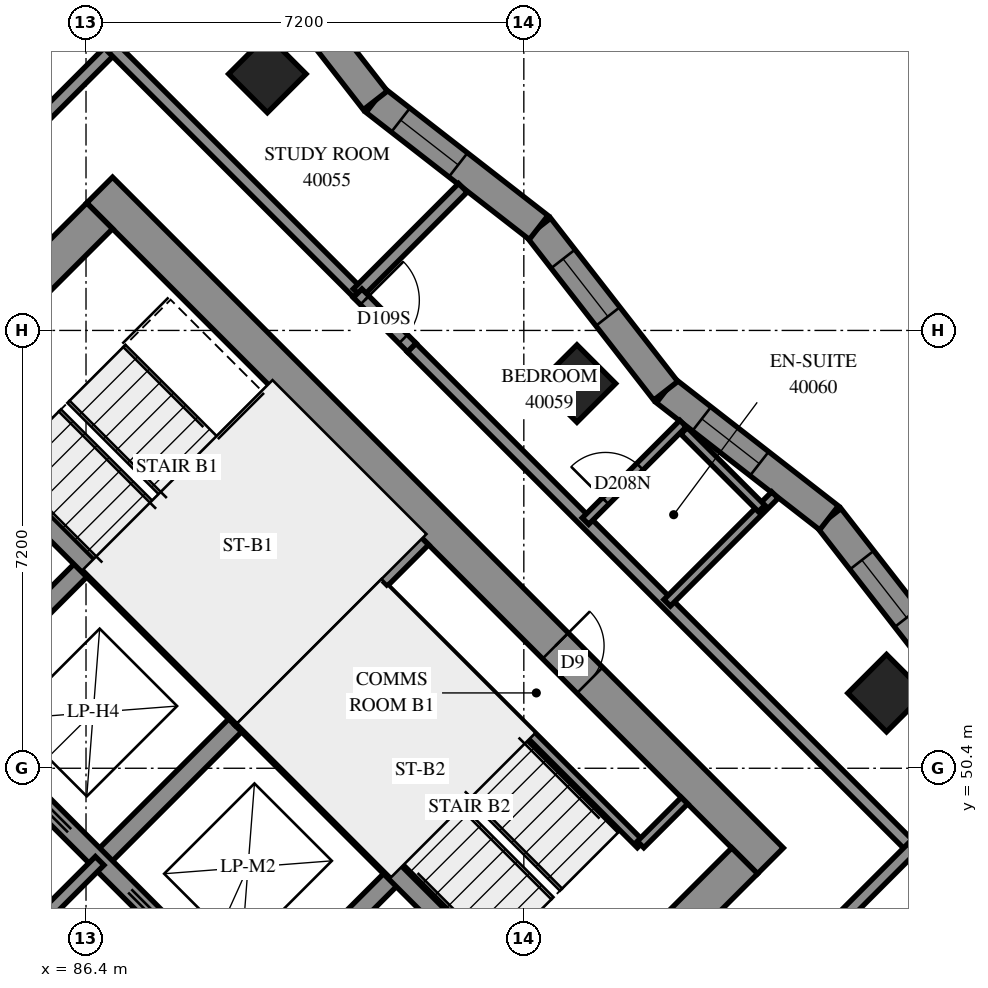
"""IFC4 building model, lengths in metres.
Left out: names, types, materials, properties, quantities, classifications, styles, units other than length and angle.
Written with IfcOpenShell. Run it as: python <this file> out.ifc"""

import sys

from ifc_helpers import new_model, si_unit, direction, frame, frame_2d, origin, origin_2d, place, context, subcontext, project, spatial, polyline, rectangle, outline, extrude, element, fill, save


model = new_model("IFC4")
c1 = context("Model", 3, precision=1e-05, world=origin(), true_north=direction((0.0, 1.0)))
c2 = subcontext(c1, "Body", "Model", "MODEL_VIEW")
j1 = project(units=[si_unit("LENGTHUNIT", "METRE"), si_unit("PLANEANGLEUNIT", "RADIAN")], contexts=[c1])
p1 = place(None, origin())
s1 = spatial("IfcSite", under=j1, at=p1, CompositionType="ELEMENT")
p2 = place(p1, origin())
s2 = spatial("IfcBuilding", under=s1, at=p2, CompositionType="ELEMENT")
p3 = place(p2, frame((0.0, 0.0, 149.0)))
s3 = spatial("IfcBuildingStorey", under=s2, at=p3, CompositionType="ELEMENT", Elevation=149.0)
for number, where, z_axis, x_axis in (
    (1, (89.382, 61.818, 0.0), (0.0, 0.0, 1.0), (0.707, -0.707, 0.0)),
    (2, (94.474, 56.727, 0.0), (0.0, 0.0, 1.0), (0.707, -0.707, 0.0)),
    (3, (99.565, 51.635, 0.0), (0.0, 0.0, 1.0), (0.707, -0.707, 0.0)),
):
    element("IfcColumn", number, at=place(p3, frame(where, z_axis=z_axis, x_axis=x_axis)), inside=s3, PredefinedType="COLUMN", context=c2, shape_type="SweptSolid", body=[
        extrude(rectangle(XDim=0.9, YDim=0.9, at=origin_2d()), origin(), (0.0, 0.0, 1.0), 3.1),
    ])
p4 = place(p3, frame((76.018, 49.302, -0.3), z_axis=(0.0, 0.0, 1.0), x_axis=(0.7071067812, -0.7071067812, 0.0)))
e4 = element("IfcWall", 4, at=p4, inside=s3, PredefinedType="SHEAR", context=c2, shape_type="SweptSolid", body=[
    extrude(rectangle(XDim=15.6, YDim=0.6, at=frame_2d((7.8, 0.0))), origin(), (0.0, 0.0, 1.0), 2.7),
])
p5 = place(p3, frame((86.625, 59.908, -0.3), z_axis=(0.0, 0.0, 1.0), x_axis=(0.7071067812, -0.7071067812, 0.0)))
e5 = element("IfcWall", 5, at=p5, inside=s3, PredefinedType="SHEAR", context=c2, shape_type="SweptSolid", body=[
    extrude(rectangle(XDim=15.6, YDim=0.6, at=frame_2d((7.8, 0.0))), origin(), (0.0, 0.0, 1.0), 2.7),
])
p6 = place(p5, frame((10.6, 0.0, 0.3)))
e6 = element("IfcOpeningElement", 6, at=p6, cuts=e5, PredefinedType="OPENING", context=c2, shape_type="SweptSolid", body=[
    extrude(rectangle(XDim=0.8, YDim=2.1, at=frame_2d((0.4, 1.05))), frame((0.0, 0.31, 0.0), z_axis=(0.0, -1.0, 0.0), x_axis=(1.0, 0.0, 0.0)), (0.0, 0.0, 1.0), 0.62),
])
p7 = place(p3, frame((76.442, 49.302, -0.3), z_axis=(0.0, 0.0, 1.0), x_axis=(0.7071067812, 0.7071067812, 0.0)))
e7 = element("IfcWall", 7, at=p7, inside=s3, PredefinedType="SHEAR", context=c2, shape_type="SweptSolid", body=[
    extrude(rectangle(XDim=14.4, YDim=0.6, at=frame_2d((7.2, 0.0))), origin(), (0.0, 0.0, 1.0), 2.7),
])
p8 = place(p7, frame((4.55, 0.0, 0.3)))
e8 = element("IfcOpeningElement", 8, at=p8, cuts=e7, PredefinedType="OPENING", context=c2, shape_type="SweptSolid", body=[
    extrude(rectangle(XDim=1.1, YDim=2.1, at=frame_2d((0.55, 1.05))), frame((0.0, 0.31, 0.0), z_axis=(0.0, -1.0, 0.0), x_axis=(1.0, 0.0, 0.0)), (0.0, 0.0, 1.0), 0.62),
])
p9 = place(p7, frame((11.35, 0.0, 0.3)))
e9 = element("IfcOpeningElement", 9, at=p9, cuts=e7, PredefinedType="OPENING", context=c2, shape_type="SweptSolid", body=[
    extrude(rectangle(XDim=1.1, YDim=2.1, at=frame_2d((0.55, 1.05))), frame((0.0, 0.31, 0.0), z_axis=(0.0, -1.0, 0.0), x_axis=(1.0, 0.0, 0.0)), (0.0, 0.0, 1.0), 0.62),
])
p10 = place(p3, frame((87.049, 38.695, -0.3), z_axis=(0.0, 0.0, 1.0), x_axis=(0.7071067812, 0.7071067812, 0.0)))
e10 = element("IfcWall", 10, at=p10, inside=s3, PredefinedType="SHEAR", context=c2, shape_type="SweptSolid", body=[
    extrude(rectangle(XDim=14.4, YDim=0.6, at=frame_2d((7.2, 0.0))), origin(), (0.0, 0.0, 1.0), 2.7),
])
p11 = place(p10, frame((4.55, 0.0, 0.3)))
e11 = element("IfcOpeningElement", 11, at=p11, cuts=e10, PredefinedType="OPENING", context=c2, shape_type="SweptSolid", body=[
    extrude(rectangle(XDim=1.1, YDim=2.1, at=frame_2d((0.55, 1.05))), frame((0.0, 0.31, 0.0), z_axis=(0.0, -1.0, 0.0), x_axis=(1.0, 0.0, 0.0)), (0.0, 0.0, 1.0), 0.62),
])
p12 = place(p10, frame((11.35, 0.0, 0.3)))
e12 = element("IfcOpeningElement", 12, at=p12, cuts=e10, PredefinedType="OPENING", context=c2, shape_type="SweptSolid", body=[
    extrude(rectangle(XDim=1.1, YDim=2.1, at=frame_2d((0.55, 1.05))), frame((0.0, 0.31, 0.0), z_axis=(0.0, -1.0, 0.0), x_axis=(1.0, 0.0, 0.0)), (0.0, 0.0, 1.0), 0.62),
])
p13 = place(p3, frame((84.079, 51.423, 0.0), z_axis=(0.0, 0.0, 1.0), x_axis=(0.7071219326, 0.7070916295, 0.0)))
e13 = element("IfcWall", 13, at=p13, inside=s3, PredefinedType="SOLIDWALL", context=c2, shape_type="SweptSolid", body=[
    extrude(rectangle(XDim=3.3, YDim=0.3, at=frame_2d((1.65, 0.0))), origin(), (0.0, 0.0, 1.0), 3.1),
])
for number, where, z_axis, x_axis in (
    (14, (86.625, 48.878, 0.0), (0.0, 0.0, 1.0), (0.707, 0.707, 0.0)),
    (15, (89.17, 46.332, 0.0), (0.0, 0.0, 1.0), (0.707, 0.707, 0.0)),
):
    element("IfcWall", number, at=place(p3, frame(where, z_axis=z_axis, x_axis=x_axis)), inside=s3, PredefinedType="SOLIDWALL", context=c2, shape_type="SweptSolid", body=[
        extrude(rectangle(XDim=3.3, YDim=0.3, at=frame_2d((1.65, 0.0))), origin(), (0.0, 0.0, 1.0), 3.1),
    ])
p14 = place(p3, frame((78.988, 51.423, 0.0), z_axis=(0.0, 0.0, 1.0), x_axis=(0.7071067812, -0.7071067812, 0.0)))
e16 = element("IfcWall", 16, at=p14, inside=s3, PredefinedType="SOLIDWALL", context=c2, shape_type="SweptSolid", body=[
    extrude(rectangle(XDim=14.4, YDim=0.3, at=frame_2d((7.2, 0.0))), origin(), (0.0, 0.0, 1.0), 3.1),
])
p15 = place(p14, frame((1.35, 0.0, 0.0)))
e17 = element("IfcOpeningElement", 17, at=p15, cuts=e16, PredefinedType="OPENING", context=c2, shape_type="SweptSolid", body=[
    extrude(rectangle(XDim=0.9, YDim=2.1, at=frame_2d((0.45, 1.05))), frame((0.0, 0.16, 0.0), z_axis=(0.0, -1.0, 0.0), x_axis=(1.0, 0.0, 0.0)), (0.0, 0.0, 1.0), 0.32),
])
p16 = place(p14, frame((4.95, 0.0, 0.0)))
e18 = element("IfcOpeningElement", 18, at=p16, cuts=e16, PredefinedType="OPENING", context=c2, shape_type="SweptSolid", body=[
    extrude(rectangle(XDim=0.9, YDim=2.1, at=frame_2d((0.45, 1.05))), frame((0.0, 0.16, 0.0), z_axis=(0.0, -1.0, 0.0), x_axis=(1.0, 0.0, 0.0)), (0.0, 0.0, 1.0), 0.32),
])
p17 = place(p14, frame((8.55, 0.0, 0.0)))
e19 = element("IfcOpeningElement", 19, at=p17, cuts=e16, PredefinedType="OPENING", context=c2, shape_type="SweptSolid", body=[
    extrude(rectangle(XDim=0.9, YDim=2.1, at=frame_2d((0.45, 1.05))), frame((0.0, 0.16, 0.0), z_axis=(0.0, -1.0, 0.0), x_axis=(1.0, 0.0, 0.0)), (0.0, 0.0, 1.0), 0.32),
])
p18 = place(p14, frame((12.05, 0.0, 0.0)))
e20 = element("IfcOpeningElement", 20, at=p18, cuts=e16, PredefinedType="OPENING", context=c2, shape_type="SweptSolid", body=[
    extrude(rectangle(XDim=1.1, YDim=2.1, at=frame_2d((0.55, 1.05))), frame((0.0, 0.16, 0.0), z_axis=(0.0, -1.0, 0.0), x_axis=(1.0, 0.0, 0.0)), (0.0, 0.0, 1.0), 0.32),
])
p19 = place(p3, frame((81.534, 53.969, 0.0), z_axis=(0.0, 0.0, 1.0), x_axis=(0.707103309, -0.7071102534, 0.0)))
e21 = element("IfcWall", 21, at=p19, inside=s3, PredefinedType="SOLIDWALL", context=c2, shape_type="SweptSolid", body=[
    extrude(rectangle(XDim=14.4, YDim=0.3, at=frame_2d((7.2, 0.0))), origin(), (0.0, 0.0, 1.0), 3.1),
])
p20 = place(p19, frame((1.25, 0.0, 0.0)))
e22 = element("IfcOpeningElement", 22, at=p20, cuts=e21, PredefinedType="OPENING", context=c2, shape_type="SweptSolid", body=[
    extrude(rectangle(XDim=1.1, YDim=2.1, at=frame_2d((0.55, 1.05))), frame((0.0, 0.16, 0.0), z_axis=(0.0, -1.0, 0.0), x_axis=(1.0, 0.0, 0.0)), (0.0, 0.0, 1.0), 0.32),
])
p21 = place(p19, frame((4.85, 0.0, 0.0)))
e23 = element("IfcOpeningElement", 23, at=p21, cuts=e21, PredefinedType="OPENING", context=c2, shape_type="SweptSolid", body=[
    extrude(rectangle(XDim=1.1, YDim=2.1, at=frame_2d((0.55, 1.05))), frame((0.0, 0.16, 0.0), z_axis=(0.0, -1.0, 0.0), x_axis=(1.0, 0.0, 0.0)), (0.0, 0.0, 1.0), 0.32),
])
p22 = place(p19, frame((8.45, 0.0, 0.0)))
e24 = element("IfcOpeningElement", 24, at=p22, cuts=e21, PredefinedType="OPENING", context=c2, shape_type="SweptSolid", body=[
    extrude(rectangle(XDim=1.1, YDim=2.1, at=frame_2d((0.55, 1.05))), frame((0.0, 0.16, 0.0), z_axis=(0.0, -1.0, 0.0), x_axis=(1.0, 0.0, 0.0)), (0.0, 0.0, 1.0), 0.32),
])
p23 = place(p19, frame((12.05, 0.0, 0.0)))
e25 = element("IfcOpeningElement", 25, at=p23, cuts=e21, PredefinedType="OPENING", context=c2, shape_type="SweptSolid", body=[
    extrude(rectangle(XDim=1.1, YDim=2.1, at=frame_2d((0.55, 1.05))), frame((0.0, 0.16, 0.0), z_axis=(0.0, -1.0, 0.0), x_axis=(1.0, 0.0, 0.0)), (0.0, 0.0, 1.0), 0.32),
])
for number, where, z_axis, x_axis in (
    (26, (83.867, 56.302, 0.0), (0.0, 0.0, 1.0), (0.707, -0.707, 0.0)),
    (27, (88.958, 51.211, 0.0), (0.0, 0.0, 1.0), (0.707, -0.707, 0.0)),
):
    element("IfcWall", number, at=place(p3, frame(where, z_axis=z_axis, x_axis=x_axis)), inside=s3, PredefinedType="SOLIDWALL", context=c2, shape_type="SweptSolid", body=[
        extrude(rectangle(XDim=7.2, YDim=0.3, at=frame_2d((3.6, 0.0))), origin(), (0.0, 0.0, 1.0), 3.1),
    ])
p24 = place(p3, frame((88.958, 51.211, 0.0), z_axis=(0.0, 0.0, 1.0), x_axis=(0.7071067812, 0.7071067812, 0.0)))
e28 = element("IfcWall", 28, at=p24, inside=s3, PredefinedType="SOLIDWALL", context=c2, shape_type="SweptSolid", body=[
    extrude(rectangle(XDim=4.2, YDim=0.3, at=frame_2d((2.1, 0.0))), origin(), (0.0, 0.0, 1.0), 3.1),
])
p25 = place(p3, frame((100.709, 51.832, 0.0), z_axis=(0.0, 0.0, 1.0), x_axis=(-0.6141887905, 0.7891591282, 0.0)))
e29 = element("IfcWall", 29, at=p25, inside=s3, PredefinedType="SOLIDWALL", context=c2, shape_type="SweptSolid", body=[
    extrude(outline(polyline([(0.031, -0.25), (3.434, -0.25), (3.372, 0.25), (-0.031, 0.25), (0.031, -0.25)])), origin(), (0.0, 0.0, 1.0), 3.1),
])
p26 = place(p25, frame((1.323, 0.0, 0.45)))
e30 = element("IfcOpeningElement", 30, at=p26, cuts=e29, PredefinedType="OPENING", context=c2, shape_type="SweptSolid", body=[
    extrude(rectangle(XDim=1.2, YDim=2.5, at=frame_2d((0.6, 1.25))), frame((0.0, 0.26, 0.0), z_axis=(0.0, -1.0, 0.0), x_axis=(1.0, 0.0, 0.0)), (0.0, 0.0, 1.0), 0.52),
])
p27 = place(p3, frame((98.619, 54.517, 0.0), z_axis=(0.0, 0.0, 1.0), x_axis=(-0.7891480422, 0.6142030344, 0.0)))
e31 = element("IfcWall", 31, at=p27, inside=s3, PredefinedType="SOLIDWALL", context=c2, shape_type="SweptSolid", body=[
    extrude(outline(polyline([(-0.031, -0.25), (3.372, -0.25), (3.434, 0.25), (0.031, 0.25), (-0.031, -0.25)])), origin(), (0.0, 0.0, 1.0), 3.1),
])
p28 = place(p27, frame((1.452, 0.0, 0.45)))
e32 = element("IfcOpeningElement", 32, at=p28, cuts=e31, PredefinedType="OPENING", context=c2, shape_type="SweptSolid", body=[
    extrude(rectangle(XDim=1.2, YDim=2.5, at=frame_2d((0.6, 1.25))), frame((0.0, 0.26, 0.0), z_axis=(0.0, -1.0, 0.0), x_axis=(1.0, 0.0, 0.0)), (0.0, 0.0, 1.0), 0.52),
])
p29 = place(p3, frame((95.934, 56.607, 0.0), z_axis=(0.0, 0.0, 1.0), x_axis=(-0.6142030344, 0.7891480422, 0.0)))
e33 = element("IfcWall", 33, at=p29, inside=s3, PredefinedType="SOLIDWALL", context=c2, shape_type="SweptSolid", body=[
    extrude(outline(polyline([(0.031, -0.25), (3.434, -0.25), (3.372, 0.25), (-0.031, 0.25), (0.031, -0.25)])), origin(), (0.0, 0.0, 1.0), 3.1),
])
p30 = place(p29, frame((1.548, 0.0, 0.45)))
e34 = element("IfcOpeningElement", 34, at=p30, cuts=e33, PredefinedType="OPENING", context=c2, shape_type="SweptSolid", body=[
    extrude(rectangle(XDim=1.2, YDim=2.5, at=frame_2d((0.6, 1.25))), frame((0.0, 0.26, 0.0), z_axis=(0.0, -1.0, 0.0), x_axis=(1.0, 0.0, 0.0)), (0.0, 0.0, 1.0), 0.52),
])
p31 = place(p3, frame((93.844, 59.293, 0.0), z_axis=(0.0, 0.0, 1.0), x_axis=(-0.7891591282, 0.6141887905, 0.0)))
e35 = element("IfcWall", 35, at=p31, inside=s3, PredefinedType="SOLIDWALL", context=c2, shape_type="SweptSolid", body=[
    extrude(outline(polyline([(-0.031, -0.25), (3.372, -0.25), (3.434, 0.25), (0.031, 0.25), (-0.031, -0.25)])), origin(), (0.0, 0.0, 1.0), 3.1),
])
p32 = place(p31, frame((1.677, 0.0, 0.45)))
e36 = element("IfcOpeningElement", 36, at=p32, cuts=e35, PredefinedType="OPENING", context=c2, shape_type="SweptSolid", body=[
    extrude(rectangle(XDim=1.2, YDim=2.5, at=frame_2d((0.6, 1.25))), frame((0.0, 0.26, 0.0), z_axis=(0.0, -1.0, 0.0), x_axis=(1.0, 0.0, 0.0)), (0.0, 0.0, 1.0), 0.52),
])
p33 = place(p3, frame((91.158, 61.383, 0.0), z_axis=(0.0, 0.0, 1.0), x_axis=(-0.6141847326, 0.7891622864, 0.0)))
e37 = element("IfcWall", 37, at=p33, inside=s3, PredefinedType="SOLIDWALL", context=c2, shape_type="SweptSolid", body=[
    extrude(outline(polyline([(0.031, -0.25), (3.434, -0.25), (3.372, 0.25), (-0.031, 0.25), (0.031, -0.25)])), origin(), (0.0, 0.0, 1.0), 3.1),
])
p34 = place(p33, frame((1.774, 0.0, 0.45)))
e38 = element("IfcOpeningElement", 38, at=p34, cuts=e37, PredefinedType="OPENING", context=c2, shape_type="SweptSolid", body=[
    extrude(rectangle(XDim=1.2, YDim=2.5, at=frame_2d((0.6, 1.25))), frame((0.0, 0.26, 0.0), z_axis=(0.0, -1.0, 0.0), x_axis=(1.0, 0.0, 0.0)), (0.0, 0.0, 1.0), 0.52),
])
p35 = place(p3, frame((91.313, 53.354, 0.0), z_axis=(0.0, 0.0, 1.0), x_axis=(0.7071067812, -0.7071067812, 0.0)))
e39 = element("IfcWall", 39, at=p35, inside=s3, PredefinedType="PARTITIONING", context=c2, shape_type="SweptSolid", body=[
    extrude(rectangle(XDim=5.95, YDim=0.15, at=frame_2d((2.975, 0.0))), origin(), (0.0, 0.0, 1.0), 3.1),
])
p36 = place(p3, frame((95.52, 49.146, 0.0), z_axis=(0.0, 0.0, 1.0), x_axis=(0.7071067812, 0.7071067812, 0.0)))
e40 = element("IfcWall", 40, at=p36, inside=s3, PredefinedType="PARTITIONING", context=c2, shape_type="SweptSolid", body=[
    extrude(rectangle(XDim=1.02, YDim=0.15, at=frame_2d((0.51, 0.0))), origin(), (0.0, 0.0, 1.0), 3.1),
])
p37 = place(p3, frame((84.079, 46.332, 0.0), z_axis=(0.0, 0.0, 1.0), x_axis=(0.7071067812, 0.7071067812, 0.0)))
e41 = element("IfcWall", 41, at=p37, inside=s3, PredefinedType="PARTITIONING", context=c2, shape_type="SweptSolid", body=[
    extrude(rectangle(XDim=3.6, YDim=0.2, at=frame_2d((1.8, 0.0))), origin(), (0.0, 0.0, 1.0), 3.1),
])
p38 = place(p3, frame((91.755, 57.317, 0.0), z_axis=(0.0, 0.0, 1.0), x_axis=(0.7071067812, -0.7071067812, 0.0)))
e42 = element("IfcWall", 42, at=p38, inside=s3, PredefinedType="PARTITIONING", context=c2, shape_type="SweptSolid", body=[
    extrude(rectangle(XDim=11.639, YDim=0.2, at=frame_2d((5.819, 0.0))), origin(), (0.0, 0.0, 1.0), 3.1),
])
p39 = place(p3, frame((95.25, 42.232, 0.0), z_axis=(0.0, 0.0, 1.0), x_axis=(0.7071114274, 0.7071021349, 0.0)))
e43 = element("IfcWall", 43, at=p39, inside=s3, PredefinedType="PARTITIONING", context=c2, shape_type="SweptSolid", body=[
    extrude(rectangle(XDim=10.761, YDim=0.2, at=frame_2d((5.381, 0.0))), origin(), (0.0, 0.0, 1.0), 3.1),
])
p40 = place(p3, frame((80.899, 58.427, 0.0), z_axis=(0.0, 0.0, 1.0), x_axis=(0.707112163, 0.7071013993, 0.0)))
e44 = element("IfcWall", 44, at=p40, inside=s3, PredefinedType="PARTITIONING", context=c2, shape_type="SweptSolid", body=[
    extrude(rectangle(XDim=9.29, YDim=0.2, at=frame_2d((4.645, 0.0))), origin(), (0.0, 0.0, 1.0), 3.1),
])
p41 = place(p3, frame((94.19, 43.292, 0.0), z_axis=(0.0, 0.0, 1.0), x_axis=(0.7071067812, 0.7071067812, 0.0)))
e45 = element("IfcWall", 45, at=p41, inside=s3, PredefinedType="PARTITIONING", context=c2, shape_type="SweptSolid", body=[
    extrude(rectangle(XDim=8.2, YDim=0.2, at=frame_2d((4.1, 0.0))), origin(), (0.0, 0.0, 1.0), 3.1),
])
p42 = place(p41, frame((0.251, 0.0, 0.0)))
e46 = element("IfcOpeningElement", 46, at=p42, cuts=e45, PredefinedType="OPENING", context=c2, shape_type="SweptSolid", body=[
    extrude(rectangle(XDim=1.0, YDim=2.1, at=frame_2d((0.5, 1.05))), frame((0.0, 0.11, 0.0), z_axis=(0.0, -1.0, 0.0), x_axis=(1.0, 0.0, 0.0)), (0.0, 0.0, 1.0), 0.22),
])
p43 = place(p3, frame((81.038, 56.444, 0.0), z_axis=(0.0, 0.0, 1.0), x_axis=(0.7071067812, 0.7071067812, 0.0)))
e47 = element("IfcWall", 47, at=p43, inside=s3, PredefinedType="PARTITIONING", context=c2, shape_type="SweptSolid", body=[
    extrude(rectangle(XDim=8.2, YDim=0.2, at=frame_2d((4.1, 0.0))), origin(), (0.0, 0.0, 1.0), 3.1),
])
p44 = place(p43, frame((0.66, 0.0, 0.0)))
e48 = element("IfcOpeningElement", 48, at=p44, cuts=e47, PredefinedType="OPENING", context=c2, shape_type="SweptSolid", body=[
    extrude(rectangle(XDim=1.0, YDim=2.1, at=frame_2d((0.5, 1.05))), frame((0.0, 0.11, 0.0), z_axis=(0.0, -1.0, 0.0), x_axis=(1.0, 0.0, 0.0)), (0.0, 0.0, 1.0), 0.22),
])
p45 = place(p3, frame((86.841, 62.245, 0.0), z_axis=(0.0, 0.0, 1.0), x_axis=(0.7071067812, -0.7071067812, 0.0)))
e49 = element("IfcWall", 49, at=p45, inside=s3, PredefinedType="PARTITIONING", context=c2, shape_type="SweptSolid", body=[
    extrude(rectangle(XDim=5.699, YDim=0.2, at=frame_2d((2.85, 0.0))), origin(), (0.0, 0.0, 1.0), 3.1),
])
p46 = place(p3, frame((95.957, 53.121, 0.0), z_axis=(0.0, 0.0, 1.0), x_axis=(0.7071067812, 0.7071067812, 0.0)))
e50 = element("IfcWall", 50, at=p46, inside=s3, PredefinedType="PARTITIONING", context=c2, shape_type="SweptSolid", body=[
    extrude(rectangle(XDim=2.506, YDim=0.15, at=frame_2d((1.253, 0.0))), origin(), (0.0, 0.0, 1.0), 3.1),
])
p47 = place(p3, frame((90.867, 58.213, 0.0), z_axis=(0.0, 0.0, 1.0), x_axis=(0.7066165577, 0.707596665, 0.0)))
e51 = element("IfcWall", 51, at=p47, inside=s3, PredefinedType="PARTITIONING", context=c2, shape_type="SweptSolid", body=[
    extrude(rectangle(XDim=2.449, YDim=0.2, at=frame_2d((1.224, 0.0))), origin(), (0.0, 0.0, 1.0), 3.1),
])
p48 = place(p3, frame((94.614, 54.464, 0.0), z_axis=(0.0, 0.0, 1.0), x_axis=(0.7070847464, 0.7071288153, 0.0)))
e52 = element("IfcWall", 52, at=p48, inside=s3, PredefinedType="PARTITIONING", context=c2, shape_type="SweptSolid", body=[
    extrude(rectangle(XDim=2.269, YDim=0.15, at=frame_2d((1.135, 0.0))), origin(), (0.0, 0.0, 1.0), 3.1),
])
p49 = place(p48, frame((0.466, 0.0, 0.0)))
e53 = element("IfcOpeningElement", 53, at=p49, cuts=e52, PredefinedType="OPENING", context=c2, shape_type="SweptSolid", body=[
    extrude(rectangle(XDim=0.8, YDim=2.1, at=frame_2d((0.4, 1.05))), frame((0.0, 0.085, 0.0), z_axis=(0.0, -1.0, 0.0), x_axis=(1.0, 0.0, 0.0)), (0.0, 0.0, 1.0), 0.17),
])
p50 = place(p3, frame((96.235, 55.949, 0.0), z_axis=(0.0, 0.0, 1.0), x_axis=(0.7071067812, -0.7071067812, 0.0)))
e54 = element("IfcWall", 54, at=p50, inside=s3, PredefinedType="PARTITIONING", context=c2, shape_type="SweptSolid", body=[
    extrude(rectangle(XDim=1.804, YDim=0.15, at=frame_2d((0.902, 0.0))), origin(), (0.0, 0.0, 1.0), 3.1),
])
p51 = place(p3, frame((90.867, 58.211, 0.0), z_axis=(0.0, 0.0, 1.0), x_axis=(0.706312726, -0.7078999456, 0.0)))
e55 = element("IfcWall", 55, at=p51, inside=s3, PredefinedType="PARTITIONING", context=c2, shape_type="SweptSolid", body=[
    extrude(rectangle(XDim=1.26, YDim=0.2, at=frame_2d((0.63, 0.0))), origin(), (0.0, 0.0, 1.0), 3.1),
])
p52 = place(p51, frame((0.162, 0.0, 0.0)))
e56 = element("IfcOpeningElement", 56, at=p52, cuts=e55, PredefinedType="OPENING", context=c2, shape_type="SweptSolid", body=[
    extrude(rectangle(XDim=0.9, YDim=2.1, at=frame_2d((0.45, 1.05))), frame((0.0, 0.11, 0.0), z_axis=(0.0, -1.0, 0.0), x_axis=(1.0, 0.0, 0.0)), (0.0, 0.0, 1.0), 0.22),
])
p53 = place(p26, origin())
e57 = element("IfcWindow", 57, at=p53, inside=s3, PartitioningType="SINGLE_PANEL", PredefinedType="WINDOW", context=c2, shape_type="SweptSolid", body=[
    extrude(rectangle(XDim=1.2, YDim=2.5, at=frame_2d((0.6, 1.25))), frame((0.0, 0.18, 0.0), z_axis=(0.0, -1.0, 0.0), x_axis=(1.0, 0.0, 0.0)), (0.0, 0.0, 1.0), 0.06),
])
fill(e30, e57)
p54 = place(p28, origin())
e58 = element("IfcWindow", 58, at=p54, inside=s3, PartitioningType="SINGLE_PANEL", PredefinedType="WINDOW", context=c2, shape_type="SweptSolid", body=[
    extrude(rectangle(XDim=1.2, YDim=2.5, at=frame_2d((0.6, 1.25))), frame((0.0, 0.18, 0.0), z_axis=(0.0, -1.0, 0.0), x_axis=(1.0, 0.0, 0.0)), (0.0, 0.0, 1.0), 0.06),
])
fill(e32, e58)
p55 = place(p30, origin())
e59 = element("IfcWindow", 59, at=p55, inside=s3, PartitioningType="SINGLE_PANEL", PredefinedType="WINDOW", context=c2, shape_type="SweptSolid", body=[
    extrude(rectangle(XDim=1.2, YDim=2.5, at=frame_2d((0.6, 1.25))), frame((0.0, 0.18, 0.0), z_axis=(0.0, -1.0, 0.0), x_axis=(1.0, 0.0, 0.0)), (0.0, 0.0, 1.0), 0.06),
])
fill(e34, e59)
p56 = place(p32, origin())
e60 = element("IfcWindow", 60, at=p56, inside=s3, PartitioningType="SINGLE_PANEL", PredefinedType="WINDOW", context=c2, shape_type="SweptSolid", body=[
    extrude(rectangle(XDim=1.2, YDim=2.5, at=frame_2d((0.6, 1.25))), frame((0.0, 0.18, 0.0), z_axis=(0.0, -1.0, 0.0), x_axis=(1.0, 0.0, 0.0)), (0.0, 0.0, 1.0), 0.06),
])
fill(e36, e60)
p57 = place(p6, origin())
e61 = element("IfcDoor", 61, at=p57, inside=s3, OperationType="SINGLE_SWING_RIGHT", PredefinedType="DOOR", context=c2, shape_type="SweptSolid", body=[
    extrude(rectangle(XDim=0.8, YDim=2.1, at=frame_2d((0.4, 1.05))), frame((0.0, 0.025, 0.0), z_axis=(0.0, -1.0, 0.0), x_axis=(1.0, 0.0, 0.0)), (0.0, 0.0, 1.0), 0.05),
])
fill(e6, e61)
p58 = place(p52, origin())
e62 = element("IfcDoor", 62, at=p58, inside=s3, OperationType="SINGLE_SWING_RIGHT", PredefinedType="DOOR", context=c2, shape_type="SweptSolid", body=[
    extrude(rectangle(XDim=0.9, YDim=2.1, at=frame_2d((0.45, 1.05))), frame((0.0, 0.025, 0.0), z_axis=(0.0, -1.0, 0.0), x_axis=(1.0, 0.0, 0.0)), (0.0, 0.0, 1.0), 0.05),
])
fill(e56, e62)
p59 = place(p49, origin())
e63 = element("IfcDoor", 63, at=p59, inside=s3, OperationType="SINGLE_SWING_RIGHT", PredefinedType="DOOR", context=c2, shape_type="SweptSolid", body=[
    extrude(rectangle(XDim=0.8, YDim=2.1, at=frame_2d((0.4, 1.05))), frame((0.0, 0.025, 0.0), z_axis=(0.0, -1.0, 0.0), x_axis=(1.0, 0.0, 0.0)), (0.0, 0.0, 1.0), 0.05),
])
fill(e53, e63)
save(model, sys.argv[1])
